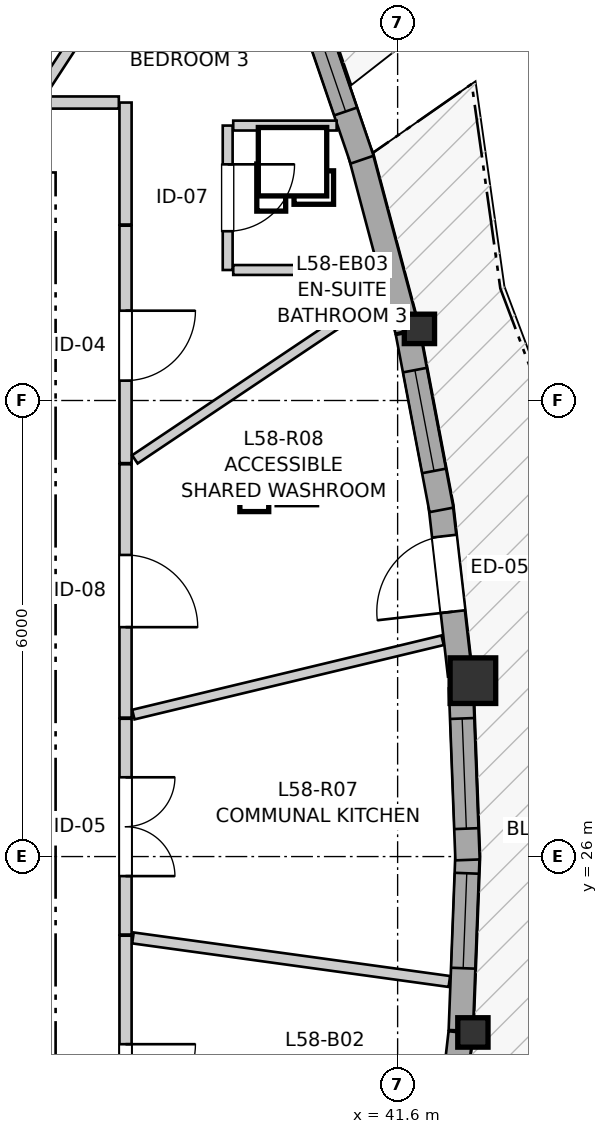
"""IFC4 building model, lengths in metres.
Left out: names, types, materials, properties, quantities, classifications, styles, units other than length and angle.
Written with IfcOpenShell. Run it as: python <this file> out.ifc"""

import sys

from ifc_helpers import new_model, si_unit, direction, frame, frame_2d, origin, origin_2d, place, context, subcontext, project, spatial, rectangle, i_section, extrude, source, transform, mapped, element, fill, save


model = new_model("IFC4")
c1 = context("Model", 3, precision=1e-05, world=origin(), true_north=direction((0.0, 1.0)))
c2 = subcontext(c1, "Body", "Model", "MODEL_VIEW")
j1 = project(units=[si_unit("LENGTHUNIT", "METRE"), si_unit("PLANEANGLEUNIT", "RADIAN")], contexts=[c1])
p1 = place(None, origin())
s1 = spatial("IfcSite", under=j1, at=p1, CompositionType="ELEMENT")
p2 = place(p1, origin())
s2 = spatial("IfcBuilding", under=s1, at=p2, CompositionType="ELEMENT")
p3 = place(p2, frame((0.0, 0.0, 195.6)))
s3 = spatial("IfcBuildingStorey", under=s2, at=p3, CompositionType="ELEMENT", Elevation=195.6)
m1 = source(origin(), c2, "Body", "SweptSolid", [
    extrude(i_section(OverallWidth=0.398, OverallDepth=0.387, WebThickness=0.019, FlangeThickness=0.03, FilletRadius=0.015, at=origin_2d()), origin(), (0.0, 0.0, 1.0), 2.96),
])
p4 = place(p3, frame((42.59, 23.686, 0.0), z_axis=(0.0, 0.0, 1.0), x_axis=(1.0, 0.0, 0.0)))
e1 = element("IfcColumn", 1, at=p4, inside=s3, PredefinedType="PILASTER", context=c2, shape_type="MappedRepresentation", body=[
    mapped(m1, transform((0.0, 0.0, 0.0), x_axis=(1.0, 0.0, 0.0), y_axis=(0.0, 1.0, 0.0), z_axis=(0.0, 0.0, 1.0), scale=1.0)),
])
m2 = source(origin(), c2, "Body", "SweptSolid", [
    extrude(rectangle(XDim=0.6, YDim=0.6, at=origin_2d()), origin(), (0.0, 0.0, 1.0), 2.96),
])
p5 = place(p3, frame((42.59, 28.314, 0.0), z_axis=(0.0, 0.0, 1.0), x_axis=(1.0, 0.0, 0.0)))
e2 = element("IfcColumn", 2, at=p5, inside=s3, PredefinedType="COLUMN", context=c2, shape_type="MappedRepresentation", body=[
    mapped(m2, transform((0.0, 0.0, 0.0), x_axis=(1.0, 0.0, 0.0), y_axis=(0.0, 1.0, 0.0), z_axis=(0.0, 0.0, 1.0), scale=1.0)),
])
p6 = place(p3, frame((41.887, 32.942, 0.0), z_axis=(0.0, 0.0, 1.0), x_axis=(1.0, 0.0, 0.0)))
e3 = element("IfcColumn", 3, at=p6, inside=s3, PredefinedType="PILASTER", context=c2, shape_type="MappedRepresentation", body=[
    mapped(m1, transform((0.0, 0.0, 0.0), x_axis=(1.0, 0.0, 0.0), y_axis=(0.0, 1.0, 0.0), z_axis=(0.0, 0.0, 1.0), scale=1.0)),
])
p7 = place(p3, frame((42.163, 21.352, 0.0), z_axis=(0.0, 0.0, 1.0), x_axis=(0.113273764078, 0.993563814947, 0.0)))
e4 = element("IfcWall", 4, at=p7, inside=s3, PredefinedType="SOLIDWALL", context=c2, shape_type="SweptSolid", body=[
    extrude(rectangle(XDim=2.347, YDim=0.32, at=frame_2d((1.174, 0.0))), origin(), (0.0, 0.0, 1.0), 2.58),
])
p8 = place(p7, frame((0.608, 0.0, 0.82)))
e5 = element("IfcOpeningElement", 5, at=p8, cuts=e4, PredefinedType="OPENING", context=c2, shape_type="SweptSolid", body=[
    extrude(rectangle(XDim=1.15, YDim=1.2, at=frame_2d((0.575, 0.6))), frame((0.0, 0.17, 0.0), z_axis=(0.0, -1.0, 0.0), x_axis=(1.0, 0.0, 0.0)), (0.0, 0.0, 1.0), 0.34),
])
p9 = place(p3, frame((42.431, 23.712, 0.0), z_axis=(0.0, 0.0, 1.0), x_axis=(0.037979071107, 0.999278534823, 0.0)))
e6 = element("IfcWall", 6, at=p9, inside=s3, PredefinedType="SOLIDWALL", context=c2, shape_type="SweptSolid", body=[
    extrude(rectangle(XDim=2.333, YDim=0.32, at=frame_2d((1.167, 0.0))), origin(), (0.0, 0.0, 1.0), 2.58),
])
p10 = place(p9, frame((0.82, 0.0, 0.82)))
e7 = element("IfcOpeningElement", 7, at=p10, cuts=e6, PredefinedType="OPENING", context=c2, shape_type="SweptSolid", body=[
    extrude(rectangle(XDim=1.25, YDim=1.35, at=frame_2d((0.625, 0.675))), frame((0.0, 0.17, 0.0), z_axis=(0.0, -1.0, 0.0), x_axis=(1.0, 0.0, 0.0)), (0.0, 0.0, 1.0), 0.34),
])
p11 = place(p3, frame((42.52, 25.956, 0.0), z_axis=(0.0, 0.0, 1.0), x_axis=(-0.038072753844, 0.999274969873, 0.0)))
e8 = element("IfcWall", 8, at=p11, inside=s3, PredefinedType="SOLIDWALL", context=c2, shape_type="SweptSolid", body=[
    extrude(rectangle(XDim=2.264, YDim=0.32, at=frame_2d((1.132, 0.0))), origin(), (0.0, 0.0, 1.0), 2.58),
])
p12 = place(p11, frame((0.412, 0.0, 0.82)))
e9 = element("IfcOpeningElement", 9, at=p12, cuts=e8, PredefinedType="OPENING", context=c2, shape_type="SweptSolid", body=[
    extrude(rectangle(XDim=1.45, YDim=1.25, at=frame_2d((0.725, 0.625))), frame((0.0, 0.17, 0.0), z_axis=(0.0, -1.0, 0.0), x_axis=(1.0, 0.0, 0.0)), (0.0, 0.0, 1.0), 0.34),
])
p13 = place(p3, frame((42.421, 28.385, 0.0), z_axis=(0.0, 0.0, 1.0), x_axis=(-0.113220012761, 0.993569941529, 0.0)))
e10 = element("IfcWall", 10, at=p13, inside=s3, PredefinedType="SOLIDWALL", context=c2, shape_type="SweptSolid", body=[
    extrude(rectangle(XDim=2.277, YDim=0.32, at=frame_2d((1.139, 0.0))), origin(), (0.0, 0.0, 1.0), 2.58),
])
p14 = place(p13, frame((0.842, 0.0, 0.0)))
e11 = element("IfcOpeningElement", 11, at=p14, cuts=e10, PredefinedType="OPENING", context=c2, shape_type="SweptSolid", body=[
    extrude(rectangle(XDim=1.0, YDim=2.1, at=frame_2d((0.5, 1.05))), frame((0.0, 0.17, 0.0), z_axis=(0.0, -1.0, 0.0), x_axis=(1.0, 0.0, 0.0)), (0.0, 0.0, 1.0), 0.34),
])
p15 = place(p3, frame((42.177, 30.561, 0.0), z_axis=(0.0, 0.0, 1.0), x_axis=(-0.186691421418, 0.982418603839, 0.0)))
e12 = element("IfcWall", 12, at=p15, inside=s3, PredefinedType="SOLIDWALL", context=c2, shape_type="SweptSolid", body=[
    extrude(rectangle(XDim=2.374, YDim=0.32, at=frame_2d((1.187, 0.0))), origin(), (0.0, 0.0, 1.0), 2.58),
])
p16 = place(p15, frame((0.522, 0.0, 0.82)))
e13 = element("IfcOpeningElement", 13, at=p16, cuts=e12, PredefinedType="OPENING", context=c2, shape_type="SweptSolid", body=[
    extrude(rectangle(XDim=1.35, YDim=1.45, at=frame_2d((0.675, 0.725))), frame((0.0, 0.17, 0.0), z_axis=(0.0, -1.0, 0.0), x_axis=(1.0, 0.0, 0.0)), (0.0, 0.0, 1.0), 0.34),
])
p17 = place(p3, frame((41.727, 32.92, 0.0), z_axis=(0.0, 0.0, 1.0), x_axis=(-0.257057896323, 0.96639600472, 0.0)))
e14 = element("IfcWall", 14, at=p17, inside=s3, PredefinedType="SOLIDWALL", context=c2, shape_type="SweptSolid", body=[
    extrude(rectangle(XDim=2.412, YDim=0.32, at=frame_2d((1.206, 0.0))), origin(), (0.0, 0.0, 1.0), 2.58),
])
p18 = place(p3, frame((41.132, 35.168, 0.0), z_axis=(0.0, 0.0, 1.0), x_axis=(-0.323654036362, 0.94617549363, 0.0)))
e15 = element("IfcWall", 15, at=p18, inside=s3, PredefinedType="SOLIDWALL", context=c2, shape_type="SweptSolid", body=[
    extrude(rectangle(XDim=2.394, YDim=0.32, at=frame_2d((1.197, 0.0))), origin(), (0.0, 0.0, 1.0), 2.58),
])
p19 = place(p18, frame((0.67, 0.0, 0.82)))
e16 = element("IfcOpeningElement", 16, at=p19, cuts=e15, PredefinedType="OPENING", context=c2, shape_type="SweptSolid", body=[
    extrude(rectangle(XDim=1.35, YDim=1.45, at=frame_2d((0.675, 0.725))), frame((0.0, 0.17, 0.0), z_axis=(0.0, -1.0, 0.0), x_axis=(1.0, 0.0, 0.0)), (0.0, 0.0, 1.0), 0.34),
])
p20 = place(p3, frame((38.02, 24.959, 0.0), z_axis=(0.0, 0.0, 1.0), x_axis=(0.0, -1.0, 0.0)))
e17 = element("IfcWall", 17, at=p20, inside=s3, PredefinedType="PARTITIONING", context=c2, shape_type="SweptSolid", body=[
    extrude(rectangle(XDim=3.759, YDim=0.16, at=frame_2d((1.879, 0.0))), origin(), (0.0, 0.0, 1.0), 2.96),
])
p21 = place(p20, frame((1.427, 0.0, 0.0)))
e18 = element("IfcOpeningElement", 18, at=p21, cuts=e17, PredefinedType="OPENING", context=c2, shape_type="SweptSolid", body=[
    extrude(rectangle(XDim=0.92, YDim=2.1, at=frame_2d((0.46, 1.05))), frame((0.0, 0.09, 0.0), z_axis=(0.0, -1.0, 0.0), x_axis=(1.0, 0.0, 0.0)), (0.0, 0.0, 1.0), 0.18),
])
p22 = place(p3, frame((38.02, 31.161, 0.0), z_axis=(0.0, 0.0, 1.0), x_axis=(0.0, -1.0, 0.0)))
e19 = element("IfcWall", 19, at=p22, inside=s3, PredefinedType="PARTITIONING", context=c2, shape_type="SweptSolid", body=[
    extrude(rectangle(XDim=3.333, YDim=0.16, at=frame_2d((1.667, 0.0))), origin(), (0.0, 0.0, 1.0), 2.628),
])
p23 = place(p22, frame((1.193, 0.0, 0.0)))
e20 = element("IfcOpeningElement", 20, at=p23, cuts=e19, PredefinedType="OPENING", context=c2, shape_type="SweptSolid", body=[
    extrude(rectangle(XDim=0.95, YDim=2.1, at=frame_2d((0.475, 1.05))), frame((0.0, 0.09, 0.0), z_axis=(0.0, -1.0, 0.0), x_axis=(1.0, 0.0, 0.0)), (0.0, 0.0, 1.0), 0.18),
])
p24 = place(p3, frame((38.02, 34.3, 0.0), z_axis=(0.0, 0.0, 1.0), x_axis=(0.0, -1.0, 0.0)))
e21 = element("IfcWall", 21, at=p24, inside=s3, PredefinedType="PARTITIONING", context=c2, shape_type="SweptSolid", body=[
    extrude(rectangle(XDim=3.124, YDim=0.16, at=frame_2d((1.562, 0.0))), origin(), (0.0, 0.0, 1.0), 2.628),
])
p25 = place(p24, frame((1.118, 0.0, 0.0)))
e22 = element("IfcOpeningElement", 22, at=p25, cuts=e21, PredefinedType="OPENING", context=c2, shape_type="SweptSolid", body=[
    extrude(rectangle(XDim=0.92, YDim=2.1, at=frame_2d((0.46, 1.05))), frame((0.0, 0.09, 0.0), z_axis=(0.0, -1.0, 0.0), x_axis=(1.0, 0.0, 0.0)), (0.0, 0.0, 1.0), 0.18),
])
p26 = place(p3, frame((38.02, 27.813, 0.0), z_axis=(0.0, 0.0, 1.0), x_axis=(0.0, -1.0, 0.0)))
e23 = element("IfcWall", 23, at=p26, inside=s3, PredefinedType="PARTITIONING", context=c2, shape_type="SweptSolid", body=[
    extrude(rectangle(XDim=2.839, YDim=0.16, at=frame_2d((1.419, 0.0))), origin(), (0.0, 0.0, 1.0), 2.96),
])
p27 = place(p26, frame((0.77, 0.0, 0.0)))
e24 = element("IfcOpeningElement", 24, at=p27, cuts=e23, PredefinedType="OPENING", context=c2, shape_type="SweptSolid", body=[
    extrude(rectangle(XDim=1.3, YDim=2.1, at=frame_2d((0.65, 1.05))), frame((0.0, 0.09, 0.0), z_axis=(0.0, -1.0, 0.0), x_axis=(1.0, 0.0, 0.0)), (0.0, 0.0, 1.0), 0.18),
])
p28 = place(p3, frame((39.364, 35.617, 0.0), z_axis=(0.0, 0.0, 1.0), x_axis=(0.0, -1.0, 0.0)))
e25 = element("IfcWall", 25, at=p28, inside=s3, PredefinedType="PARTITIONING", context=c2, shape_type="SweptSolid", body=[
    extrude(rectangle(XDim=1.9, YDim=0.13, at=frame_2d((0.95, 0.0))), origin(), (0.0, 0.0, 1.0), 2.598),
])
p29 = place(p28, frame((0.51, 0.0, 0.0)))
e26 = element("IfcOpeningElement", 26, at=p29, cuts=e25, PredefinedType="OPENING", context=c2, shape_type="SweptSolid", body=[
    extrude(rectangle(XDim=0.88, YDim=2.05, at=frame_2d((0.44, 1.025))), frame((0.0, 0.075, 0.0), z_axis=(0.0, -1.0, 0.0), x_axis=(1.0, 0.0, 0.0)), (0.0, 0.0, 1.0), 0.15),
])
p30 = place(p3, frame((36.82, 35.92, 0.0), z_axis=(0.0, 0.0, 1.0), x_axis=(0.546222005159, 0.83764044857, 0.0)))
e27 = element("IfcWall", 27, at=p30, inside=s3, PredefinedType="PARTITIONING", context=c2, shape_type="SweptSolid", body=[
    extrude(rectangle(XDim=4.881, YDim=0.145, at=frame_2d((2.44, 0.0))), origin(), (0.0, 0.0, 1.0), 2.96),
])
p31 = place(p3, frame((38.118, 24.929, 0.0), z_axis=(0.0, 0.0, 1.0), x_axis=(0.990658246077, -0.136368029533, 0.0)))
e28 = element("IfcWall", 28, at=p31, inside=s3, PredefinedType="PARTITIONING", context=c2, shape_type="SweptSolid", body=[
    extrude(rectangle(XDim=4.202, YDim=0.145, at=frame_2d((2.101, 0.0))), origin(), (0.0, 0.0, 1.0), 2.96),
])
p32 = place(p3, frame((38.123, 27.868, 0.0), z_axis=(0.0, 0.0, 1.0), x_axis=(0.972302502293, 0.233726002051, 0.0)))
e29 = element("IfcWall", 29, at=p32, inside=s3, PredefinedType="PARTITIONING", context=c2, shape_type="SweptSolid", body=[
    extrude(rectangle(XDim=4.185, YDim=0.13, at=frame_2d((2.092, 0.0))), origin(), (0.0, 0.0, 1.0), 2.96),
])
p33 = place(p3, frame((38.143, 31.225, 0.0), z_axis=(0.0, 0.0, 1.0), x_axis=(0.830560844451, 0.556927898084, 0.0)))
e30 = element("IfcWall", 30, at=p33, inside=s3, PredefinedType="PARTITIONING", context=c2, shape_type="SweptSolid", body=[
    extrude(rectangle(XDim=3.942, YDim=0.13, at=frame_2d((1.971, 0.0))), origin(), (0.0, 0.0, 1.0), 2.96),
])
p34 = place(p3, frame((39.437, 33.717, 0.0), z_axis=(0.0, 0.0, 1.0), x_axis=(1.0, 0.0, 0.0)))
e31 = element("IfcWall", 31, at=p34, inside=s3, PredefinedType="PARTITIONING", context=c2, shape_type="SweptSolid", body=[
    extrude(rectangle(XDim=1.727, YDim=0.13, at=frame_2d((0.864, 0.0))), origin(), (0.0, 0.0, 1.0), 2.96),
])
p35 = place(p3, frame((38.02, 34.315, 0.0), z_axis=(0.0, 0.0, 1.0), x_axis=(0.0, 1.0, 0.0)))
e32 = element("IfcWall", 32, at=p35, inside=s3, PredefinedType="PARTITIONING", context=c2, shape_type="SweptSolid", body=[
    extrude(rectangle(XDim=1.605, YDim=0.16, at=frame_2d((0.802, 0.0))), origin(), (0.0, 0.0, 1.0), 2.628),
])
p36 = place(p3, frame((39.437, 35.617, 0.0), z_axis=(0.0, 0.0, 1.0), x_axis=(1.0, 0.0, 0.0)))
e33 = element("IfcWall", 33, at=p36, inside=s3, PredefinedType="PARTITIONING", context=c2, shape_type="SweptSolid", body=[
    extrude(rectangle(XDim=1.361, YDim=0.13, at=frame_2d((0.68, 0.0))), origin(), (0.0, 0.0, 1.0), 2.96),
])
p37 = place(p3, frame((36.949, 35.92, 0.0), z_axis=(0.0, 0.0, 1.0), x_axis=(1.0, 0.0, 0.0)))
e34 = element("IfcWall", 34, at=p37, inside=s3, PredefinedType="PARTITIONING", context=c2, shape_type="SweptSolid", body=[
    extrude(rectangle(XDim=0.983, YDim=0.16, at=frame_2d((0.492, 0.0))), origin(), (0.0, 0.0, 1.0), 2.96),
])
m3 = source(origin(), c2, "Body", "SweptSolid", [
    extrude(rectangle(XDim=1.25, YDim=1.35, at=frame_2d((0.625, 0.675))), frame((0.0, 0.03, 0.0), z_axis=(0.0, -1.0, 0.0), x_axis=(1.0, 0.0, 0.0)), (0.0, 0.0, 1.0), 0.06),
])
p38 = place(p10, origin())
e35 = element("IfcWindow", 35, at=p38, inside=s3, PartitioningType="SINGLE_PANEL", PredefinedType="WINDOW", context=c2, shape_type="MappedRepresentation", body=[
    mapped(m3, transform((0.0, 0.0, 0.0), x_axis=(1.0, 0.0, 0.0), y_axis=(0.0, 1.0, 0.0), z_axis=(0.0, 0.0, 1.0), scale=1.0)),
])
fill(e7, e35)
m4 = source(origin(), c2, "Body", "SweptSolid", [
    extrude(rectangle(XDim=1.45, YDim=1.25, at=frame_2d((0.725, 0.625))), frame((0.0, 0.03, 0.0), z_axis=(0.0, -1.0, 0.0), x_axis=(1.0, 0.0, 0.0)), (0.0, 0.0, 1.0), 0.06),
])
p39 = place(p12, origin())
e36 = element("IfcWindow", 36, at=p39, inside=s3, PartitioningType="SINGLE_PANEL", PredefinedType="WINDOW", context=c2, shape_type="MappedRepresentation", body=[
    mapped(m4, transform((0.0, 0.0, 0.0), x_axis=(1.0, 0.0, 0.0), y_axis=(0.0, 1.0, 0.0), z_axis=(0.0, 0.0, 1.0), scale=1.0)),
])
fill(e9, e36)
m5 = source(origin(), c2, "Body", "SweptSolid", [
    extrude(rectangle(XDim=1.0, YDim=2.1, at=frame_2d((0.5, 1.05))), frame((0.0, 0.025, 0.0), z_axis=(0.0, -1.0, 0.0), x_axis=(1.0, 0.0, 0.0)), (0.0, 0.0, 1.0), 0.05),
])
p40 = place(p14, origin())
e37 = element("IfcDoor", 37, at=p40, inside=s3, OperationType="SINGLE_SWING_LEFT", PredefinedType="DOOR", context=c2, shape_type="MappedRepresentation", body=[
    mapped(m5, transform((0.0, 0.0, 0.0), x_axis=(1.0, 0.0, 0.0), y_axis=(0.0, 1.0, 0.0), z_axis=(0.0, 0.0, 1.0), scale=1.0)),
])
fill(e11, e37)
m6 = source(origin(), c2, "Body", "SweptSolid", [
    extrude(rectangle(XDim=1.35, YDim=1.45, at=frame_2d((0.675, 0.725))), frame((0.0, 0.03, 0.0), z_axis=(0.0, -1.0, 0.0), x_axis=(1.0, 0.0, 0.0)), (0.0, 0.0, 1.0), 0.06),
])
p41 = place(p16, origin())
e38 = element("IfcWindow", 38, at=p41, inside=s3, PartitioningType="SINGLE_PANEL", PredefinedType="WINDOW", context=c2, shape_type="MappedRepresentation", body=[
    mapped(m6, transform((0.0, 0.0, 0.0), x_axis=(1.0, 0.0, 0.0), y_axis=(0.0, 1.0, 0.0), z_axis=(0.0, 0.0, 1.0), scale=1.0)),
])
fill(e13, e38)
p42 = place(p19, origin())
e39 = element("IfcWindow", 39, at=p42, inside=s3, PartitioningType="SINGLE_PANEL", PredefinedType="WINDOW", context=c2, shape_type="MappedRepresentation", body=[
    mapped(m6, transform((0.0, 0.0, 0.0), x_axis=(1.0, 0.0, 0.0), y_axis=(0.0, 1.0, 0.0), z_axis=(0.0, 0.0, 1.0), scale=1.0)),
])
fill(e16, e39)
m7 = source(origin(), c2, "Body", "SweptSolid", [
    extrude(rectangle(XDim=0.92, YDim=2.1, at=frame_2d((0.46, 1.05))), frame((0.0, 0.025, 0.0), z_axis=(0.0, -1.0, 0.0), x_axis=(1.0, 0.0, 0.0)), (0.0, 0.0, 1.0), 0.05),
])
p43 = place(p21, origin())
e40 = element("IfcDoor", 40, at=p43, inside=s3, OperationType="SINGLE_SWING_LEFT", PredefinedType="DOOR", context=c2, shape_type="MappedRepresentation", body=[
    mapped(m7, transform((0.0, 0.0, 0.0), x_axis=(1.0, 0.0, 0.0), y_axis=(0.0, 1.0, 0.0), z_axis=(0.0, 0.0, 1.0), scale=1.0)),
])
fill(e18, e40)
m8 = source(origin(), c2, "Body", "SweptSolid", [
    extrude(rectangle(XDim=0.95, YDim=2.1, at=frame_2d((0.475, 1.05))), frame((0.0, 0.025, 0.0), z_axis=(0.0, -1.0, 0.0), x_axis=(1.0, 0.0, 0.0)), (0.0, 0.0, 1.0), 0.05),
])
p44 = place(p23, origin())
e41 = element("IfcDoor", 41, at=p44, inside=s3, OperationType="SINGLE_SWING_RIGHT", PredefinedType="DOOR", context=c2, shape_type="MappedRepresentation", body=[
    mapped(m8, transform((0.0, 0.0, 0.0), x_axis=(1.0, 0.0, 0.0), y_axis=(0.0, 1.0, 0.0), z_axis=(0.0, 0.0, 1.0), scale=1.0)),
])
fill(e20, e41)
p45 = place(p25, origin())
e42 = element("IfcDoor", 42, at=p45, inside=s3, OperationType="SINGLE_SWING_LEFT", PredefinedType="DOOR", context=c2, shape_type="MappedRepresentation", body=[
    mapped(m7, transform((0.0, 0.0, 0.0), x_axis=(1.0, 0.0, 0.0), y_axis=(0.0, 1.0, 0.0), z_axis=(0.0, 0.0, 1.0), scale=1.0)),
])
fill(e22, e42)
m9 = source(origin(), c2, "Body", "SweptSolid", [
    extrude(rectangle(XDim=1.3, YDim=2.1, at=frame_2d((0.65, 1.05))), frame((0.0, 0.025, 0.0), z_axis=(0.0, -1.0, 0.0), x_axis=(1.0, 0.0, 0.0)), (0.0, 0.0, 1.0), 0.05),
])
p46 = place(p27, origin())
e43 = element("IfcDoor", 43, at=p46, inside=s3, OperationType="DOUBLE_DOOR_SINGLE_SWING", PredefinedType="DOOR", context=c2, shape_type="MappedRepresentation", body=[
    mapped(m9, transform((0.0, 0.0, 0.0), x_axis=(1.0, 0.0, 0.0), y_axis=(0.0, 1.0, 0.0), z_axis=(0.0, 0.0, 1.0), scale=1.0)),
])
fill(e24, e43)
m10 = source(origin(), c2, "Body", "SweptSolid", [
    extrude(rectangle(XDim=0.88, YDim=2.05, at=frame_2d((0.44, 1.025))), frame((0.0, 0.025, 0.0), z_axis=(0.0, -1.0, 0.0), x_axis=(1.0, 0.0, 0.0)), (0.0, 0.0, 1.0), 0.05),
])
p47 = place(p29, origin())
e44 = element("IfcDoor", 44, at=p47, inside=s3, OperationType="SINGLE_SWING_LEFT", PredefinedType="DOOR", context=c2, shape_type="MappedRepresentation", body=[
    mapped(m10, transform((0.0, 0.0, 0.0), x_axis=(1.0, 0.0, 0.0), y_axis=(0.0, 1.0, 0.0), z_axis=(0.0, 0.0, 1.0), scale=1.0)),
])
fill(e26, e44)
save(model, sys.argv[1])
